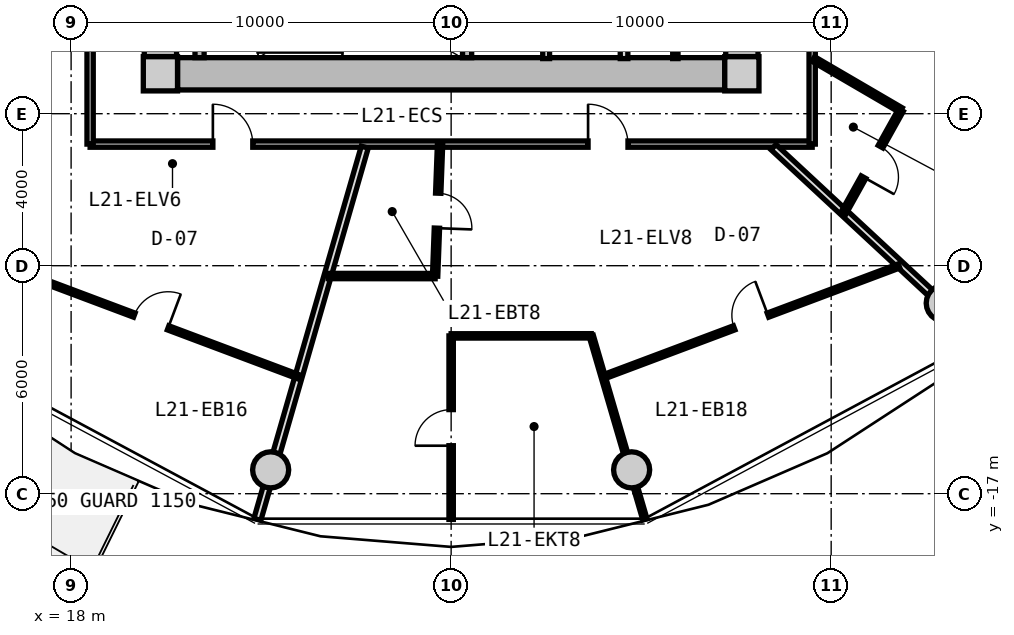
"""IFC4 building model, lengths in metres.
Left out: names, types, materials, properties, quantities, classifications, styles, units other than length and angle.
Written with IfcOpenShell. Run it as: python <this file> out.ifc"""

import sys

from ifc_helpers import new_model, si_unit, direction, frame, frame_2d, origin, origin_2d, place, context, subcontext, project, spatial, rectangle, circle, extrude, source, transform, mapped, element, fill, save


model = new_model("IFC4")
c1 = context("Model", 3, precision=1e-05, world=origin(), true_north=direction((0.0, 1.0)))
c2 = subcontext(c1, "Body", "Model", "MODEL_VIEW")
j1 = project(units=[si_unit("LENGTHUNIT", "METRE"), si_unit("PLANEANGLEUNIT", "RADIAN")], contexts=[c1])
p1 = place(None, origin())
s1 = spatial("IfcSite", under=j1, at=p1, CompositionType="ELEMENT")
p2 = place(p1, origin())
s2 = spatial("IfcBuilding", under=s1, at=p2, CompositionType="ELEMENT")
p3 = place(p2, frame((0.0, 0.0, 70.4)))
s3 = spatial("IfcBuildingStorey", under=s2, at=p3, CompositionType="ELEMENT", Elevation=70.4)
m1 = source(origin(), c2, "Body", "SweptSolid", [
    extrude(rectangle(XDim=0.9, YDim=0.9, at=origin_2d()), origin(), (0.0, 0.0, 1.0), 3.05),
])
for number, where, z_axis, x_axis in (
    (1, (20.35, -5.95, 0.0), (0.0, 0.0, 1.0), (1.0, 0.0, 0.0)),
    (2, (35.65, -5.95, 0.0), (0.0, 0.0, 1.0), (1.0, 0.0, 0.0)),
):
    element("IfcColumn", number, at=place(p3, frame(where, z_axis=z_axis, x_axis=x_axis)), inside=s3, PredefinedType="COLUMN", context=c2, shape_type="MappedRepresentation", body=[
        mapped(m1, transform((0.0, 0.0, 0.0), x_axis=(1.0, 0.0, 0.0), y_axis=(0.0, 1.0, 0.0), z_axis=(0.0, 0.0, 1.0), scale=1.0)),
    ])
m2 = source(origin(), c2, "Body", "SweptSolid", [
    extrude(rectangle(XDim=14.4, YDim=0.85, at=frame_2d((7.2, 0.0))), origin(), (0.0, 0.0, 1.0), 2.73),
])
p4 = place(p3, frame((35.2, -5.95, 0.0), z_axis=(0.0, 0.0, 1.0), x_axis=(-1.0, 0.0, 0.0)))
e3 = element("IfcWall", 3, at=p4, inside=s3, PredefinedType="SHEAR", context=c2, shape_type="MappedRepresentation", body=[
    mapped(m2, transform((0.0, 0.0, 0.0), x_axis=(1.0, 0.0, 0.0), y_axis=(0.0, 1.0, 0.0), z_axis=(0.0, 0.0, 1.0), scale=1.0)),
])
m3 = source(origin(), c2, "Body", "SweptSolid", [
    extrude(rectangle(XDim=11.0, YDim=0.85, at=frame_2d((5.5, 0.0))), origin(), (0.0, 0.0, 1.0), 2.73),
])
p5 = place(p3, frame((20.35, -5.5, 0.0), z_axis=(0.0, 0.0, 1.0), x_axis=(0.0, 1.0, 0.0)))
e4 = element("IfcWall", 4, at=p5, inside=s3, PredefinedType="SHEAR", context=c2, shape_type="MappedRepresentation", body=[
    mapped(m3, transform((0.0, 0.0, 0.0), x_axis=(1.0, 0.0, 0.0), y_axis=(0.0, 1.0, 0.0), z_axis=(0.0, 0.0, 1.0), scale=1.0)),
])
p6 = place(p5, frame((3.8, 0.0, 0.0)))
e5 = element("IfcOpeningElement", 5, at=p6, cuts=e4, PredefinedType="OPENING", context=c2, shape_type="SweptSolid", body=[
    extrude(rectangle(XDim=1.2, YDim=2.15, at=frame_2d((0.6, 1.075))), frame((0.0, 0.435, 0.0), z_axis=(0.0, -1.0, 0.0), x_axis=(1.0, 0.0, 0.0)), (0.0, 0.0, 1.0), 0.87),
])
p7 = place(p3, frame((35.65, 5.5, 0.0), z_axis=(0.0, 0.0, 1.0), x_axis=(0.0, -1.0, 0.0)))
e6 = element("IfcWall", 6, at=p7, inside=s3, PredefinedType="SHEAR", context=c2, shape_type="MappedRepresentation", body=[
    mapped(m3, transform((0.0, 0.0, 0.0), x_axis=(1.0, 0.0, 0.0), y_axis=(0.0, 1.0, 0.0), z_axis=(0.0, 0.0, 1.0), scale=1.0)),
])
p8 = place(p7, frame((5.65, 0.0, 0.0)))
e7 = element("IfcOpeningElement", 7, at=p8, cuts=e6, PredefinedType="OPENING", context=c2, shape_type="SweptSolid", body=[
    extrude(rectangle(XDim=1.2, YDim=2.15, at=frame_2d((0.6, 1.075))), frame((0.0, 0.435, 0.0), z_axis=(0.0, -1.0, 0.0), x_axis=(1.0, 0.0, 0.0)), (0.0, 0.0, 1.0), 0.87),
])
m4 = source(origin(), c2, "Body", "SweptSolid", [
    extrude(circle(Radius=0.475, at=origin_2d()), origin(), (0.0, 0.0, 1.0), 3.05),
])
for number, where, z_axis, x_axis in (
    (8, (23.251, -16.373, 0.0), (0.0, 0.0, 1.0), (1.0, 0.0, 0.0)),
    (9, (32.749, -16.373, 0.0), (0.0, 0.0, 1.0), (1.0, 0.0, 0.0)),
    (10, (40.975, -11.985, 0.0), (0.0, 0.0, 1.0), (1.0, 0.0, 0.0)),
):
    element("IfcColumn", number, at=place(p3, frame(where, z_axis=z_axis, x_axis=x_axis)), inside=s3, PredefinedType="COLUMN", context=c2, shape_type="MappedRepresentation", body=[
        mapped(m4, transform((0.0, 0.0, 0.0), x_axis=(1.0, 0.0, 0.0), y_axis=(0.0, 1.0, 0.0), z_axis=(0.0, 0.0, 1.0), scale=1.0)),
    ])
m5 = source(origin(), c2, "Body", "SweptSolid", [
    extrude(rectangle(XDim=3.075, YDim=0.24, at=frame_2d((1.538, 0.0))), origin(), (0.0, 0.0, 1.0), 2.73),
])
for number, where, z_axis, x_axis in (
    (11, (21.38, -5.525, 0.0), (0.0, 0.0, 1.0), (0.0, 1.0, 0.0)),
    (12, (28.42, -5.525, 0.0), (0.0, 0.0, 1.0), (0.0, 1.0, 0.0)),
):
    element("IfcWall", number, at=place(p3, frame(where, z_axis=z_axis, x_axis=x_axis)), inside=s3, PredefinedType="PARTITIONING", context=c2, shape_type="MappedRepresentation", body=[
        mapped(m5, transform((0.0, 0.0, 0.0), x_axis=(1.0, 0.0, 0.0), y_axis=(0.0, 1.0, 0.0), z_axis=(0.0, 0.0, 1.0), scale=1.0)),
    ])
m6 = source(origin(), c2, "Body", "SweptSolid", [
    extrude(rectangle(XDim=3.8, YDim=0.2, at=frame_2d((1.9, 0.0))), origin(), (0.0, 0.0, 1.0), 2.715),
])
p9 = place(p3, frame((32.55, -5.55, 0.0), z_axis=(0.0, 0.0, 1.0), x_axis=(0.0, 1.0, 0.0)))
e13 = element("IfcWall", 13, at=p9, inside=s3, PredefinedType="PARTITIONING", context=c2, shape_type="MappedRepresentation", body=[
    mapped(m6, transform((0.0, 0.0, 0.0), x_axis=(1.0, 0.0, 0.0), y_axis=(0.0, 1.0, 0.0), z_axis=(0.0, 0.0, 1.0), scale=1.0)),
])
m7 = source(origin(), c2, "Body", "SweptSolid", [
    extrude(rectangle(XDim=3.22, YDim=0.18, at=frame_2d((1.61, 0.0))), origin(), (0.0, 0.0, 1.0), 2.715),
])
p10 = place(p3, frame((30.5, -5.55, 0.0), z_axis=(0.0, 0.0, 1.0), x_axis=(0.0, 1.0, 0.0)))
e14 = element("IfcWall", 14, at=p10, inside=s3, PredefinedType="PARTITIONING", context=c2, shape_type="MappedRepresentation", body=[
    mapped(m7, transform((0.0, 0.0, 0.0), x_axis=(1.0, 0.0, 0.0), y_axis=(0.0, 1.0, 0.0), z_axis=(0.0, 0.0, 1.0), scale=1.0)),
])
m8 = source(origin(), c2, "Body", "SweptSolid", [
    extrude(rectangle(XDim=3.8, YDim=0.14, at=frame_2d((1.9, 0.0))), origin(), (0.0, 0.0, 1.0), 2.715),
])
p11 = place(p3, frame((33.9, -5.55, 0.0), z_axis=(0.0, 0.0, 1.0), x_axis=(0.0, 1.0, 0.0)))
e15 = element("IfcWall", 15, at=p11, inside=s3, PredefinedType="PARTITIONING", context=c2, shape_type="MappedRepresentation", body=[
    mapped(m8, transform((0.0, 0.0, 0.0), x_axis=(1.0, 0.0, 0.0), y_axis=(0.0, 1.0, 0.0), z_axis=(0.0, 0.0, 1.0), scale=1.0)),
])
m9 = source(origin(), c2, "Body", "SweptSolid", [
    extrude(rectangle(XDim=19.0, YDim=0.165, at=frame_2d((9.5, 0.0))), origin(), (0.0, 0.0, 1.0), 2.715),
])
p12 = place(p3, frame((37.5, -7.8, 0.0), z_axis=(0.0, 0.0, 1.0), x_axis=(-1.0, 0.0, 0.0)))
e16 = element("IfcWall", 16, at=p12, inside=s3, PredefinedType="PARTITIONING", context=c2, shape_type="MappedRepresentation", body=[
    mapped(m9, transform((0.0, 0.0, 0.0), x_axis=(1.0, 0.0, 0.0), y_axis=(0.0, 1.0, 0.0), z_axis=(0.0, 0.0, 1.0), scale=1.0)),
])
p13 = place(p12, frame((14.72, 0.0, 0.0)))
e17 = element("IfcOpeningElement", 17, at=p13, cuts=e16, PredefinedType="OPENING", context=c2, shape_type="SweptSolid", body=[
    extrude(rectangle(XDim=1.05, YDim=2.15, at=frame_2d((0.525, 1.075))), frame((0.0, 0.093, 0.0), z_axis=(0.0, -1.0, 0.0), x_axis=(1.0, 0.0, 0.0)), (0.0, 0.0, 1.0), 0.185),
])
p14 = place(p12, frame((4.847, 0.0, 0.0)))
e18 = element("IfcOpeningElement", 18, at=p14, cuts=e16, PredefinedType="OPENING", context=c2, shape_type="SweptSolid", body=[
    extrude(rectangle(XDim=1.05, YDim=2.15, at=frame_2d((0.525, 1.075))), frame((0.0, 0.093, 0.0), z_axis=(0.0, -1.0, 0.0), x_axis=(1.0, 0.0, 0.0)), (0.0, 0.0, 1.0), 0.185),
])
m10 = source(origin(), c2, "Body", "SweptSolid", [
    extrude(rectangle(XDim=15.6, YDim=0.165, at=frame_2d((7.8, 0.0))), origin(), (0.0, 0.0, 1.0), 2.715),
])
p15 = place(p3, frame((18.5, -7.8, 0.0), z_axis=(0.0, 0.0, 1.0), x_axis=(0.0, 1.0, 0.0)))
e19 = element("IfcWall", 19, at=p15, inside=s3, PredefinedType="PARTITIONING", context=c2, shape_type="MappedRepresentation", body=[
    mapped(m10, transform((0.0, 0.0, 0.0), x_axis=(1.0, 0.0, 0.0), y_axis=(0.0, 1.0, 0.0), z_axis=(0.0, 0.0, 1.0), scale=1.0)),
])
p16 = place(p15, frame((14.215, 0.0, 0.0)))
e20 = element("IfcOpeningElement", 20, at=p16, cuts=e19, PredefinedType="OPENING", context=c2, shape_type="SweptSolid", body=[
    extrude(rectangle(XDim=0.92, YDim=2.1, at=frame_2d((0.46, 1.05))), frame((0.0, 0.093, 0.0), z_axis=(0.0, -1.0, 0.0), x_axis=(1.0, 0.0, 0.0)), (0.0, 0.0, 1.0), 0.185),
])
p17 = place(p15, frame((11.609, 0.0, 0.0)))
e21 = element("IfcOpeningElement", 21, at=p17, cuts=e19, PredefinedType="OPENING", context=c2, shape_type="SweptSolid", body=[
    extrude(rectangle(XDim=0.92, YDim=2.1, at=frame_2d((0.46, 1.05))), frame((0.0, 0.093, 0.0), z_axis=(0.0, -1.0, 0.0), x_axis=(1.0, 0.0, 0.0)), (0.0, 0.0, 1.0), 0.185),
])
p18 = place(p15, frame((7.175, 0.0, 0.0)))
e22 = element("IfcOpeningElement", 22, at=p18, cuts=e19, PredefinedType="OPENING", context=c2, shape_type="SweptSolid", body=[
    extrude(rectangle(XDim=1.25, YDim=2.2, at=frame_2d((0.625, 1.1))), frame((0.0, 0.093, 0.0), z_axis=(0.0, -1.0, 0.0), x_axis=(1.0, 0.0, 0.0)), (0.0, 0.0, 1.0), 0.185),
])
p19 = place(p3, frame((37.5, 7.8, 0.0), z_axis=(0.0, 0.0, 1.0), x_axis=(0.0, -1.0, 0.0)))
e23 = element("IfcWall", 23, at=p19, inside=s3, PredefinedType="PARTITIONING", context=c2, shape_type="MappedRepresentation", body=[
    mapped(m10, transform((0.0, 0.0, 0.0), x_axis=(1.0, 0.0, 0.0), y_axis=(0.0, 1.0, 0.0), z_axis=(0.0, 0.0, 1.0), scale=1.0)),
])
p20 = place(p19, frame((8.835, 0.0, 0.0)))
e24 = element("IfcOpeningElement", 24, at=p20, cuts=e23, PredefinedType="OPENING", context=c2, shape_type="SweptSolid", body=[
    extrude(rectangle(XDim=1.05, YDim=2.15, at=frame_2d((0.525, 1.075))), frame((0.0, 0.093, 0.0), z_axis=(0.0, -1.0, 0.0), x_axis=(1.0, 0.0, 0.0)), (0.0, 0.0, 1.0), 0.185),
])
m11 = source(origin(), c2, "Body", "SweptSolid", [
    extrude(rectangle(XDim=10.196, YDim=0.19, at=frame_2d((5.098, 0.0))), origin(), (0.0, 0.0, 1.0), 2.165),
])
p21 = place(p3, frame((25.727, -7.88, 0.0), z_axis=(0.0, 0.0, 1.0), x_axis=(-0.277136420347, -0.960830580549, 0.0)))
e25 = element("IfcWall", 25, at=p21, inside=s3, PredefinedType="PARTITIONING", context=c2, shape_type="MappedRepresentation", body=[
    mapped(m11, transform((0.0, 0.0, 0.0), x_axis=(1.0, 0.0, 0.0), y_axis=(0.0, 1.0, 0.0), z_axis=(0.0, 0.0, 1.0), scale=1.0)),
])
m12 = source(origin(), c2, "Body", "SweptSolid", [
    extrude(rectangle(XDim=8.32, YDim=0.115, at=frame_2d((4.16, 0.0))), origin(), (0.0, 0.0, 1.0), 2.715),
])
p22 = place(p3, frame((16.214, -11.006, 0.0), z_axis=(0.0, 0.0, 1.0), x_axis=(0.936180763098, -0.351518959382, 0.0)))
e26 = element("IfcWall", 26, at=p22, inside=s3, PredefinedType="PARTITIONING", context=c2, shape_type="MappedRepresentation", body=[
    mapped(m12, transform((0.0, 0.0, 0.0), x_axis=(1.0, 0.0, 0.0), y_axis=(0.0, 1.0, 0.0), z_axis=(0.0, 0.0, 1.0), scale=1.0)),
])
p23 = place(p22, frame((3.685, 0.0, 0.0)))
e27 = element("IfcOpeningElement", 27, at=p23, cuts=e26, PredefinedType="OPENING", context=c2, shape_type="SweptSolid", body=[
    extrude(rectangle(XDim=0.95, YDim=2.1, at=frame_2d((0.475, 1.05))), frame((0.0, 0.067, 0.0), z_axis=(0.0, -1.0, 0.0), x_axis=(1.0, 0.0, 0.0)), (0.0, 0.0, 1.0), 0.135),
])
m13 = source(origin(), c2, "Body", "SweptSolid", [
    extrude(rectangle(XDim=2.834, YDim=0.14, at=frame_2d((1.417, 0.0))), origin(), (0.0, 0.0, 1.0), 2.715),
])
p24 = place(p3, frame((18.47, -4.732, 0.0), z_axis=(0.0, 0.0, 1.0), x_axis=(-0.895681174462, -0.444696788513, 0.0)))
e28 = element("IfcWall", 28, at=p24, inside=s3, PredefinedType="PARTITIONING", context=c2, shape_type="MappedRepresentation", body=[
    mapped(m13, transform((0.0, 0.0, 0.0), x_axis=(1.0, 0.0, 0.0), y_axis=(0.0, 1.0, 0.0), z_axis=(0.0, 0.0, 1.0), scale=1.0)),
])
m14 = source(origin(), c2, "Body", "SweptSolid", [
    extrude(rectangle(XDim=7.435, YDim=0.19, at=frame_2d((3.717, 0.0))), origin(), (0.0, 0.0, 1.0), 2.165),
])
p25 = place(p3, frame((36.483, -7.88, 0.0), z_axis=(0.0, 0.0, 1.0), x_axis=(0.732651956848, -0.680603489652, 0.0)))
e29 = element("IfcWall", 29, at=p25, inside=s3, PredefinedType="PARTITIONING", context=c2, shape_type="MappedRepresentation", body=[
    mapped(m14, transform((0.0, 0.0, 0.0), x_axis=(1.0, 0.0, 0.0), y_axis=(0.0, 1.0, 0.0), z_axis=(0.0, 0.0, 1.0), scale=1.0)),
])
p26 = place(p3, frame((31.997, -13.93, 0.0), z_axis=(0.0, 0.0, 1.0), x_axis=(0.936180763098, 0.351518959382, 0.0)))
e30 = element("IfcWall", 30, at=p26, inside=s3, PredefinedType="PARTITIONING", context=c2, shape_type="MappedRepresentation", body=[
    mapped(m12, transform((0.0, 0.0, 0.0), x_axis=(1.0, 0.0, 0.0), y_axis=(0.0, 1.0, 0.0), z_axis=(0.0, 0.0, 1.0), scale=1.0)),
])
p27 = place(p26, frame((3.685, 0.0, 0.0)))
e31 = element("IfcOpeningElement", 31, at=p27, cuts=e30, PredefinedType="OPENING", context=c2, shape_type="SweptSolid", body=[
    extrude(rectangle(XDim=0.95, YDim=2.1, at=frame_2d((0.475, 1.05))), frame((0.0, 0.067, 0.0), z_axis=(0.0, -1.0, 0.0), x_axis=(1.0, 0.0, 0.0)), (0.0, 0.0, 1.0), 0.135),
])
m15 = source(origin(), c2, "Body", "SweptSolid", [
    extrude(rectangle(XDim=5.031, YDim=0.115, at=frame_2d((2.515, 0.0))), origin(), (0.0, 0.0, 1.0), 2.165),
])
p28 = place(p3, frame((31.687, -12.848, 0.0), z_axis=(0.0, 0.0, 1.0), x_axis=(0.280657788738, -0.959807900374, 0.0)))
e32 = element("IfcWall", 32, at=p28, inside=s3, PredefinedType="PARTITIONING", context=c2, shape_type="MappedRepresentation", body=[
    mapped(m15, transform((0.0, 0.0, 0.0), x_axis=(1.0, 0.0, 0.0), y_axis=(0.0, 1.0, 0.0), z_axis=(0.0, 0.0, 1.0), scale=1.0)),
])
m16 = source(origin(), c2, "Body", "SweptSolid", [
    extrude(rectangle(XDim=3.446, YDim=0.14, at=frame_2d((1.723, 0.0))), origin(), (0.0, 0.0, 1.0), 2.715),
])
p29 = place(p3, frame((27.707, -7.83, 0.0), z_axis=(0.0, 0.0, 1.0), x_axis=(-0.037409983043, -0.999300001585, 0.0)))
e33 = element("IfcWall", 33, at=p29, inside=s3, PredefinedType="PARTITIONING", context=c2, shape_type="MappedRepresentation", body=[
    mapped(m16, transform((0.0, 0.0, 0.0), x_axis=(1.0, 0.0, 0.0), y_axis=(0.0, 1.0, 0.0), z_axis=(0.0, 0.0, 1.0), scale=1.0)),
])
p30 = place(p29, frame((1.263, 0.0, 0.0)))
e34 = element("IfcOpeningElement", 34, at=p30, cuts=e33, PredefinedType="OPENING", context=c2, shape_type="SweptSolid", body=[
    extrude(rectangle(XDim=0.92, YDim=2.1, at=frame_2d((0.46, 1.05))), frame((0.0, 0.08, 0.0), z_axis=(0.0, -1.0, 0.0), x_axis=(1.0, 0.0, 0.0)), (0.0, 0.0, 1.0), 0.16),
])
m17 = source(origin(), c2, "Body", "SweptSolid", [
    extrude(rectangle(XDim=2.813, YDim=0.14, at=frame_2d((1.406, 0.0))), origin(), (0.0, 0.0, 1.0), 2.715),
])
p31 = place(p3, frame((27.578, -11.273, 0.0), z_axis=(0.0, 0.0, 1.0), x_axis=(-0.99999981542, 0.000607586035, 0.0)))
e35 = element("IfcWall", 35, at=p31, inside=s3, PredefinedType="PARTITIONING", context=c2, shape_type="MappedRepresentation", body=[
    mapped(m17, transform((0.0, 0.0, 0.0), x_axis=(1.0, 0.0, 0.0), y_axis=(0.0, 1.0, 0.0), z_axis=(0.0, 0.0, 1.0), scale=1.0)),
])
m18 = source(origin(), c2, "Body", "SweptSolid", [
    extrude(rectangle(XDim=4.829, YDim=0.115, at=frame_2d((2.415, 0.0))), origin(), (0.0, 0.0, 1.0), 2.715),
])
p32 = place(p3, frame((28.0, -12.848, 0.0), z_axis=(0.0, 0.0, 1.0), x_axis=(0.0, -1.0, 0.0)))
e36 = element("IfcWall", 36, at=p32, inside=s3, PredefinedType="PARTITIONING", context=c2, shape_type="MappedRepresentation", body=[
    mapped(m18, transform((0.0, 0.0, 0.0), x_axis=(1.0, 0.0, 0.0), y_axis=(0.0, 1.0, 0.0), z_axis=(0.0, 0.0, 1.0), scale=1.0)),
])
p33 = place(p32, frame((1.939, 0.0, 0.0)))
e37 = element("IfcOpeningElement", 37, at=p33, cuts=e36, PredefinedType="OPENING", context=c2, shape_type="SweptSolid", body=[
    extrude(rectangle(XDim=0.95, YDim=2.1, at=frame_2d((0.475, 1.05))), frame((0.0, 0.067, 0.0), z_axis=(0.0, -1.0, 0.0), x_axis=(1.0, 0.0, 0.0)), (0.0, 0.0, 1.0), 0.135),
])
m19 = source(origin(), c2, "Body", "SweptSolid", [
    extrude(rectangle(XDim=3.686, YDim=0.115, at=frame_2d((1.843, 0.0))), origin(), (0.0, 0.0, 1.0), 2.715),
])
p34 = place(p3, frame((28.0, -12.848, 0.0), z_axis=(0.0, 0.0, 1.0), x_axis=(0.999999780653, 0.000662339237, 0.0)))
e38 = element("IfcWall", 38, at=p34, inside=s3, PredefinedType="PARTITIONING", context=c2, shape_type="MappedRepresentation", body=[
    mapped(m19, transform((0.0, 0.0, 0.0), x_axis=(1.0, 0.0, 0.0), y_axis=(0.0, 1.0, 0.0), z_axis=(0.0, 0.0, 1.0), scale=1.0)),
])
m20 = source(origin(), c2, "Body", "SweptSolid", [
    extrude(rectangle(XDim=2.669, YDim=0.14, at=frame_2d((1.335, 0.0))), origin(), (0.0, 0.0, 1.0), 2.715),
])
p35 = place(p3, frame((37.53, -5.561, 0.0), z_axis=(0.0, 0.0, 1.0), x_axis=(0.86369928178, -0.50400749067, 0.0)))
e39 = element("IfcWall", 39, at=p35, inside=s3, PredefinedType="PARTITIONING", context=c2, shape_type="MappedRepresentation", body=[
    mapped(m20, transform((0.0, 0.0, 0.0), x_axis=(1.0, 0.0, 0.0), y_axis=(0.0, 1.0, 0.0), z_axis=(0.0, 0.0, 1.0), scale=1.0)),
])
m21 = source(origin(), c2, "Body", "SweptSolid", [
    extrude(rectangle(XDim=3.121, YDim=0.14, at=frame_2d((1.561, 0.0))), origin(), (0.0, 0.0, 1.0), 2.715),
])
p36 = place(p3, frame((39.836, -6.906, 0.0), z_axis=(0.0, 0.0, 1.0), x_axis=(-0.487302357327, -0.873233309342, 0.0)))
e40 = element("IfcWall", 40, at=p36, inside=s3, PredefinedType="PARTITIONING", context=c2, shape_type="MappedRepresentation", body=[
    mapped(m21, transform((0.0, 0.0, 0.0), x_axis=(1.0, 0.0, 0.0), y_axis=(0.0, 1.0, 0.0), z_axis=(0.0, 0.0, 1.0), scale=1.0)),
])
p37 = place(p36, frame((1.101, 0.0, 0.0)))
e41 = element("IfcOpeningElement", 41, at=p37, cuts=e40, PredefinedType="OPENING", context=c2, shape_type="SweptSolid", body=[
    extrude(rectangle(XDim=0.92, YDim=2.1, at=frame_2d((0.46, 1.05))), frame((0.0, 0.08, 0.0), z_axis=(0.0, -1.0, 0.0), x_axis=(1.0, 0.0, 0.0)), (0.0, 0.0, 1.0), 0.16),
])
m22 = source(origin(), c2, "Body", "SweptSolid", [
    extrude(rectangle(XDim=1.05, YDim=2.15, at=frame_2d((0.525, 1.075))), frame((0.0, 0.025, 0.0), z_axis=(0.0, -1.0, 0.0), x_axis=(1.0, 0.0, 0.0)), (0.0, 0.0, 1.0), 0.05),
])
p38 = place(p13, frame((1.05, 0.0, 0.0), z_axis=(0.0, 0.0, 1.0), x_axis=(-1.0, 0.0, 0.0)))
e42 = element("IfcDoor", 42, at=p38, inside=s3, OperationType="SINGLE_SWING_LEFT", PredefinedType="DOOR", context=c2, shape_type="MappedRepresentation", body=[
    mapped(m22, transform((0.0, 0.0, 0.0), x_axis=(1.0, 0.0, 0.0), y_axis=(0.0, 1.0, 0.0), z_axis=(0.0, 0.0, 1.0), scale=1.0)),
])
fill(e17, e42)
m23 = source(origin(), c2, "Body", "SweptSolid", [
    extrude(rectangle(XDim=0.95, YDim=2.1, at=frame_2d((0.475, 1.05))), frame((0.0, 0.025, 0.0), z_axis=(0.0, -1.0, 0.0), x_axis=(1.0, 0.0, 0.0)), (0.0, 0.0, 1.0), 0.05),
])
p39 = place(p23, origin())
e43 = element("IfcDoor", 43, at=p39, inside=s3, OperationType="SINGLE_SWING_RIGHT", PredefinedType="DOOR", context=c2, shape_type="MappedRepresentation", body=[
    mapped(m23, transform((0.0, 0.0, 0.0), x_axis=(1.0, 0.0, 0.0), y_axis=(0.0, 1.0, 0.0), z_axis=(0.0, 0.0, 1.0), scale=1.0)),
])
fill(e27, e43)
p40 = place(p14, frame((1.05, 0.0, 0.0), z_axis=(0.0, 0.0, 1.0), x_axis=(-1.0, 0.0, 0.0)))
e44 = element("IfcDoor", 44, at=p40, inside=s3, OperationType="SINGLE_SWING_LEFT", PredefinedType="DOOR", context=c2, shape_type="MappedRepresentation", body=[
    mapped(m22, transform((0.0, 0.0, 0.0), x_axis=(1.0, 0.0, 0.0), y_axis=(0.0, 1.0, 0.0), z_axis=(0.0, 0.0, 1.0), scale=1.0)),
])
fill(e18, e44)
m24 = source(origin(), c2, "Body", "SweptSolid", [
    extrude(rectangle(XDim=0.92, YDim=2.1, at=frame_2d((0.46, 1.05))), frame((0.0, 0.025, 0.0), z_axis=(0.0, -1.0, 0.0), x_axis=(1.0, 0.0, 0.0)), (0.0, 0.0, 1.0), 0.05),
])
p41 = place(p30, origin())
e45 = element("IfcDoor", 45, at=p41, inside=s3, OperationType="SINGLE_SWING_RIGHT", PredefinedType="DOOR", context=c2, shape_type="MappedRepresentation", body=[
    mapped(m24, transform((0.0, 0.0, 0.0), x_axis=(1.0, 0.0, 0.0), y_axis=(0.0, 1.0, 0.0), z_axis=(0.0, 0.0, 1.0), scale=1.0)),
])
fill(e34, e45)
p42 = place(p33, frame((0.95, 0.0, 0.0), z_axis=(0.0, 0.0, 1.0), x_axis=(-1.0, 0.0, 0.0)))
e46 = element("IfcDoor", 46, at=p42, inside=s3, OperationType="SINGLE_SWING_LEFT", PredefinedType="DOOR", context=c2, shape_type="MappedRepresentation", body=[
    mapped(m23, transform((0.0, 0.0, 0.0), x_axis=(1.0, 0.0, 0.0), y_axis=(0.0, 1.0, 0.0), z_axis=(0.0, 0.0, 1.0), scale=1.0)),
])
fill(e37, e46)
p43 = place(p27, origin())
e47 = element("IfcDoor", 47, at=p43, inside=s3, OperationType="SINGLE_SWING_RIGHT", PredefinedType="DOOR", context=c2, shape_type="MappedRepresentation", body=[
    mapped(m23, transform((0.0, 0.0, 0.0), x_axis=(1.0, 0.0, 0.0), y_axis=(0.0, 1.0, 0.0), z_axis=(0.0, 0.0, 1.0), scale=1.0)),
])
fill(e31, e47)
p44 = place(p37, origin())
e48 = element("IfcDoor", 48, at=p44, inside=s3, OperationType="SINGLE_SWING_RIGHT", PredefinedType="DOOR", context=c2, shape_type="MappedRepresentation", body=[
    mapped(m24, transform((0.0, 0.0, 0.0), x_axis=(1.0, 0.0, 0.0), y_axis=(0.0, 1.0, 0.0), z_axis=(0.0, 0.0, 1.0), scale=1.0)),
])
fill(e41, e48)
save(model, sys.argv[1])
